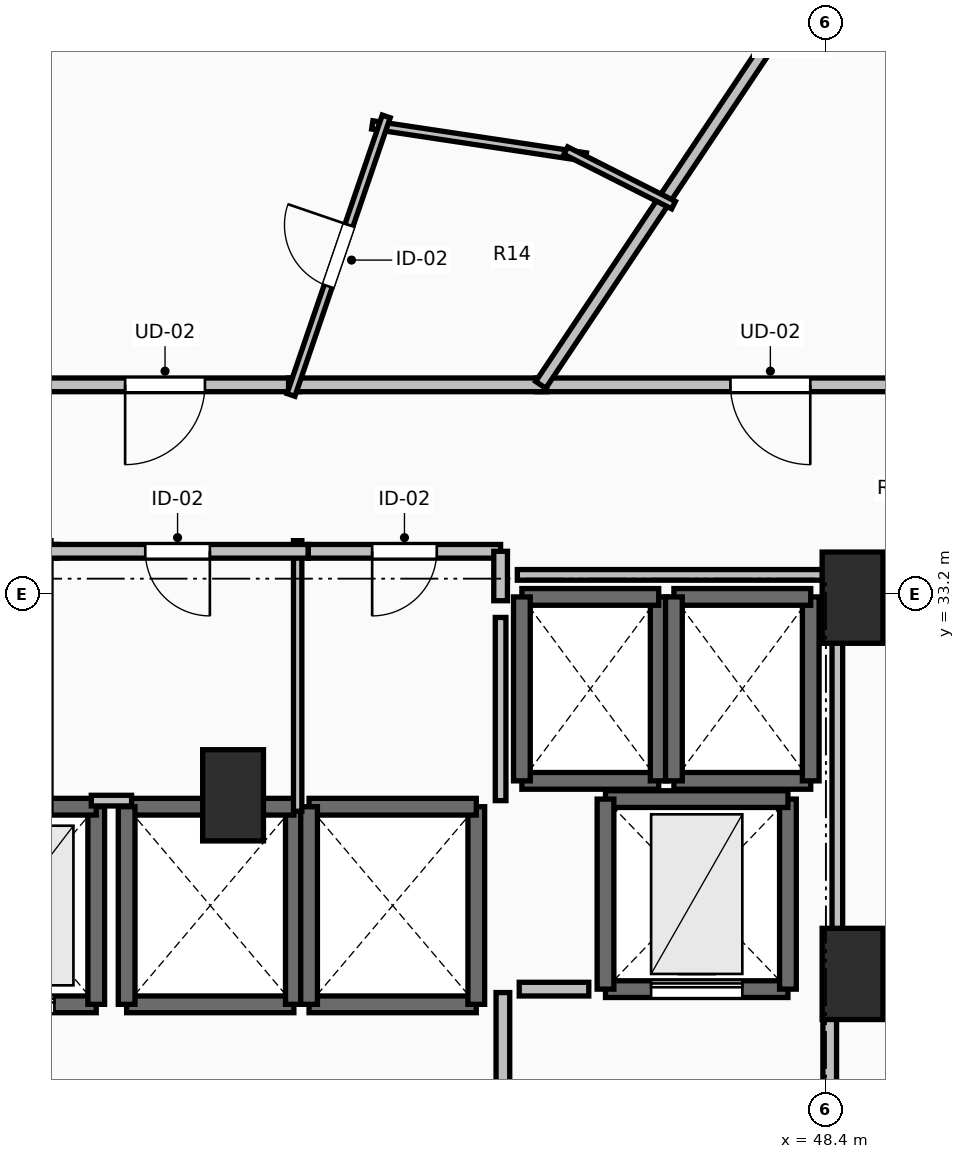
"""IFC4 building model, lengths in metres.
Left out: names, types, materials, properties, quantities, classifications, styles, units other than length and angle.
Written with IfcOpenShell. Run it as: python <this file> out.ifc"""

import sys

from ifc_helpers import new_model, si_unit, direction, frame, frame_2d, origin, origin_2d, place, context, subcontext, project, spatial, rectangle, extrude, element, fill, save


model = new_model("IFC4")
c1 = context("Model", 3, precision=1e-05, world=origin(), true_north=direction((0.0, 1.0)))
c2 = subcontext(c1, "Body", "Model", "MODEL_VIEW")
j1 = project(units=[si_unit("LENGTHUNIT", "METRE"), si_unit("PLANEANGLEUNIT", "RADIAN")], contexts=[c1])
p1 = place(None, origin())
s1 = spatial("IfcSite", under=j1, at=p1, CompositionType="ELEMENT")
p2 = place(p1, origin())
s2 = spatial("IfcBuilding", under=s1, at=p2, CompositionType="ELEMENT")
p3 = place(p2, frame((0.0, 0.0, 45.0)))
s3 = spatial("IfcBuildingStorey", under=s2, at=p3, CompositionType="ELEMENT", Elevation=45.0)
for number, where, z_axis, x_axis in (
    (1, (48.75, 33.15, 0.0), (0.0, 0.0, 1.0), (1.0, 0.0, 0.0)),
    (2, (48.75, 28.2, 0.0), (0.0, 0.0, 1.0), (1.0, 0.0, 0.0)),
    (3, (40.6, 30.55, 0.0), (0.0, 0.0, 1.0), (1.0, 0.0, 0.0)),
):
    element("IfcColumn", number, at=place(p3, frame(where, z_axis=z_axis, x_axis=x_axis)), inside=s3, PredefinedType="PILASTER", context=c2, shape_type="SweptSolid", body=[
        extrude(rectangle(XDim=0.8, YDim=1.2, at=origin_2d()), origin(), (0.0, 0.0, 1.0), 3.5),
    ])
p4 = place(p3, frame((36.6, 27.8, 0.0), z_axis=(0.0, 0.0, 1.0), x_axis=(1.0, 0.0, 0.0)))
e4 = element("IfcWall", 4, at=p4, inside=s3, PredefinedType="SOLIDWALL", context=c2, shape_type="SweptSolid", body=[
    extrude(rectangle(XDim=2.2, YDim=0.22, at=frame_2d((1.1, 0.0))), origin(), (0.0, 0.0, 1.0), 3.24),
])
p5 = place(p4, frame((0.55, 0.0, 0.0)))
e5 = element("IfcOpeningElement", 5, at=p5, cuts=e4, PredefinedType="OPENING", context=c2, shape_type="SweptSolid", body=[
    extrude(rectangle(XDim=1.1, YDim=2.2, at=frame_2d((0.55, 1.1))), frame((0.0, 0.125, 0.0), z_axis=(0.0, -1.0, 0.0), x_axis=(1.0, 0.0, 0.0)), (0.0, 0.0, 1.0), 0.25),
])
p6 = place(p3, frame((38.8, 27.8, 0.0), z_axis=(0.0, 0.0, 1.0), x_axis=(0.0, 1.0, 0.0)))
e6 = element("IfcWall", 6, at=p6, inside=s3, PredefinedType="SOLIDWALL", context=c2, shape_type="SweptSolid", body=[
    extrude(rectangle(XDim=2.6, YDim=0.22, at=frame_2d((1.3, 0.0))), origin(), (0.0, 0.0, 1.0), 3.24),
])
for number, where, z_axis, x_axis in (
    (7, (38.8, 30.4, 0.0), (0.0, 0.0, 1.0), (-1.0, 0.0, 0.0)),
    (8, (39.2, 27.8, 0.0), (0.0, 0.0, 1.0), (1.0, 0.0, 0.0)),
):
    element("IfcWall", number, at=place(p3, frame(where, z_axis=z_axis, x_axis=x_axis)), inside=s3, PredefinedType="SOLIDWALL", context=c2, shape_type="SweptSolid", body=[
        extrude(rectangle(XDim=2.2, YDim=0.22, at=frame_2d((1.1, 0.0))), origin(), (0.0, 0.0, 1.0), 3.24),
    ])
p7 = place(p3, frame((41.4, 27.8, 0.0), z_axis=(0.0, 0.0, 1.0), x_axis=(0.0, 1.0, 0.0)))
e9 = element("IfcWall", 9, at=p7, inside=s3, PredefinedType="SOLIDWALL", context=c2, shape_type="SweptSolid", body=[
    extrude(rectangle(XDim=2.6, YDim=0.22, at=frame_2d((1.3, 0.0))), origin(), (0.0, 0.0, 1.0), 3.24),
])
p8 = place(p3, frame((41.4, 30.4, 0.0), z_axis=(0.0, 0.0, 1.0), x_axis=(-1.0, 0.0, 0.0)))
e10 = element("IfcWall", 10, at=p8, inside=s3, PredefinedType="SOLIDWALL", context=c2, shape_type="SweptSolid", body=[
    extrude(rectangle(XDim=2.2, YDim=0.22, at=frame_2d((1.1, 0.0))), origin(), (0.0, 0.0, 1.0), 3.24),
])
p9 = place(p3, frame((39.2, 30.4, 0.0), z_axis=(0.0, 0.0, 1.0), x_axis=(0.0, -1.0, 0.0)))
e11 = element("IfcWall", 11, at=p9, inside=s3, PredefinedType="SOLIDWALL", context=c2, shape_type="SweptSolid", body=[
    extrude(rectangle(XDim=2.6, YDim=0.22, at=frame_2d((1.3, 0.0))), origin(), (0.0, 0.0, 1.0), 3.24),
])
p10 = place(p3, frame((41.6, 27.8, 0.0), z_axis=(0.0, 0.0, 1.0), x_axis=(1.0, 0.0, 0.0)))
e12 = element("IfcWall", 12, at=p10, inside=s3, PredefinedType="SOLIDWALL", context=c2, shape_type="SweptSolid", body=[
    extrude(rectangle(XDim=2.2, YDim=0.22, at=frame_2d((1.1, 0.0))), origin(), (0.0, 0.0, 1.0), 3.24),
])
p11 = place(p3, frame((43.8, 27.8, 0.0), z_axis=(0.0, 0.0, 1.0), x_axis=(0.0, 1.0, 0.0)))
e13 = element("IfcWall", 13, at=p11, inside=s3, PredefinedType="SOLIDWALL", context=c2, shape_type="SweptSolid", body=[
    extrude(rectangle(XDim=2.6, YDim=0.22, at=frame_2d((1.3, 0.0))), origin(), (0.0, 0.0, 1.0), 3.24),
])
p12 = place(p3, frame((43.8, 30.4, 0.0), z_axis=(0.0, 0.0, 1.0), x_axis=(-1.0, 0.0, 0.0)))
e14 = element("IfcWall", 14, at=p12, inside=s3, PredefinedType="SOLIDWALL", context=c2, shape_type="SweptSolid", body=[
    extrude(rectangle(XDim=2.2, YDim=0.22, at=frame_2d((1.1, 0.0))), origin(), (0.0, 0.0, 1.0), 3.24),
])
p13 = place(p3, frame((41.6, 30.4, 0.0), z_axis=(0.0, 0.0, 1.0), x_axis=(0.0, -1.0, 0.0)))
e15 = element("IfcWall", 15, at=p13, inside=s3, PredefinedType="SOLIDWALL", context=c2, shape_type="SweptSolid", body=[
    extrude(rectangle(XDim=2.6, YDim=0.22, at=frame_2d((1.3, 0.0))), origin(), (0.0, 0.0, 1.0), 3.24),
])
p14 = place(p3, frame((44.4, 30.74, 0.0), z_axis=(0.0, 0.0, 1.0), x_axis=(1.0, 0.0, 0.0)))
e16 = element("IfcWall", 16, at=p14, inside=s3, PredefinedType="SOLIDWALL", context=c2, shape_type="SweptSolid", body=[
    extrude(rectangle(XDim=1.8, YDim=0.22, at=frame_2d((0.9, 0.0))), origin(), (0.0, 0.0, 1.0), 3.24),
])
p15 = place(p3, frame((46.2, 30.74, 0.0), z_axis=(0.0, 0.0, 1.0), x_axis=(0.0, 1.0, 0.0)))
e17 = element("IfcWall", 17, at=p15, inside=s3, PredefinedType="SOLIDWALL", context=c2, shape_type="SweptSolid", body=[
    extrude(rectangle(XDim=2.42, YDim=0.22, at=frame_2d((1.21, 0.0))), origin(), (0.0, 0.0, 1.0), 3.24),
])
p16 = place(p3, frame((46.2, 33.16, 0.0), z_axis=(0.0, 0.0, 1.0), x_axis=(-1.0, 0.0, 0.0)))
e18 = element("IfcWall", 18, at=p16, inside=s3, PredefinedType="SOLIDWALL", context=c2, shape_type="SweptSolid", body=[
    extrude(rectangle(XDim=1.8, YDim=0.22, at=frame_2d((0.9, 0.0))), origin(), (0.0, 0.0, 1.0), 3.24),
])
p17 = place(p3, frame((44.4, 33.16, 0.0), z_axis=(0.0, 0.0, 1.0), x_axis=(0.0, -1.0, 0.0)))
e19 = element("IfcWall", 19, at=p17, inside=s3, PredefinedType="SOLIDWALL", context=c2, shape_type="SweptSolid", body=[
    extrude(rectangle(XDim=2.42, YDim=0.22, at=frame_2d((1.21, 0.0))), origin(), (0.0, 0.0, 1.0), 3.24),
])
p18 = place(p3, frame((46.4, 30.74, 0.0), z_axis=(0.0, 0.0, 1.0), x_axis=(1.0, 0.0, 0.0)))
e20 = element("IfcWall", 20, at=p18, inside=s3, PredefinedType="SOLIDWALL", context=c2, shape_type="SweptSolid", body=[
    extrude(rectangle(XDim=1.8, YDim=0.22, at=frame_2d((0.9, 0.0))), origin(), (0.0, 0.0, 1.0), 3.24),
])
p19 = place(p3, frame((48.2, 30.74, 0.0), z_axis=(0.0, 0.0, 1.0), x_axis=(0.0, 1.0, 0.0)))
e21 = element("IfcWall", 21, at=p19, inside=s3, PredefinedType="SOLIDWALL", context=c2, shape_type="SweptSolid", body=[
    extrude(rectangle(XDim=2.42, YDim=0.22, at=frame_2d((1.21, 0.0))), origin(), (0.0, 0.0, 1.0), 3.24),
])
p20 = place(p3, frame((48.2, 33.16, 0.0), z_axis=(0.0, 0.0, 1.0), x_axis=(-1.0, 0.0, 0.0)))
e22 = element("IfcWall", 22, at=p20, inside=s3, PredefinedType="SOLIDWALL", context=c2, shape_type="SweptSolid", body=[
    extrude(rectangle(XDim=1.8, YDim=0.22, at=frame_2d((0.9, 0.0))), origin(), (0.0, 0.0, 1.0), 3.24),
])
p21 = place(p3, frame((46.4, 33.16, 0.0), z_axis=(0.0, 0.0, 1.0), x_axis=(0.0, -1.0, 0.0)))
e23 = element("IfcWall", 23, at=p21, inside=s3, PredefinedType="SOLIDWALL", context=c2, shape_type="SweptSolid", body=[
    extrude(rectangle(XDim=2.42, YDim=0.22, at=frame_2d((1.21, 0.0))), origin(), (0.0, 0.0, 1.0), 3.24),
])
p22 = place(p3, frame((45.5, 28.0, 0.0), z_axis=(0.0, 0.0, 1.0), x_axis=(1.0, 0.0, 0.0)))
e24 = element("IfcWall", 24, at=p22, inside=s3, PredefinedType="SHEAR", context=c2, shape_type="SweptSolid", body=[
    extrude(rectangle(XDim=2.4, YDim=0.22, at=frame_2d((1.2, 0.0))), origin(), (0.0, 0.0, 1.0), 3.24),
])
p23 = place(p22, frame((0.6, 0.0, 0.0)))
e25 = element("IfcOpeningElement", 25, at=p23, cuts=e24, PredefinedType="OPENING", context=c2, shape_type="SweptSolid", body=[
    extrude(rectangle(XDim=1.2, YDim=2.2, at=frame_2d((0.6, 1.1))), frame((0.0, 0.125, 0.0), z_axis=(0.0, -1.0, 0.0), x_axis=(1.0, 0.0, 0.0)), (0.0, 0.0, 1.0), 0.25),
])
p24 = place(p3, frame((47.9, 28.0, 0.0), z_axis=(0.0, 0.0, 1.0), x_axis=(0.0, 1.0, 0.0)))
e26 = element("IfcWall", 26, at=p24, inside=s3, PredefinedType="SHEAR", context=c2, shape_type="SweptSolid", body=[
    extrude(rectangle(XDim=2.5, YDim=0.22, at=frame_2d((1.25, 0.0))), origin(), (0.0, 0.0, 1.0), 3.24),
])
p25 = place(p3, frame((47.9, 30.5, 0.0), z_axis=(0.0, 0.0, 1.0), x_axis=(-1.0, 0.0, 0.0)))
e27 = element("IfcWall", 27, at=p25, inside=s3, PredefinedType="SHEAR", context=c2, shape_type="SweptSolid", body=[
    extrude(rectangle(XDim=2.4, YDim=0.22, at=frame_2d((1.2, 0.0))), origin(), (0.0, 0.0, 1.0), 3.24),
])
p26 = place(p3, frame((45.5, 30.5, 0.0), z_axis=(0.0, 0.0, 1.0), x_axis=(0.0, -1.0, 0.0)))
e28 = element("IfcWall", 28, at=p26, inside=s3, PredefinedType="SHEAR", context=c2, shape_type="SweptSolid", body=[
    extrude(rectangle(XDim=2.5, YDim=0.22, at=frame_2d((1.25, 0.0))), origin(), (0.0, 0.0, 1.0), 3.24),
])
p27 = place(p3, frame((44.15, 27.955, 0.0), z_axis=(0.0, 0.0, 1.0), x_axis=(0.0, -1.0, 0.0)))
e29 = element("IfcWall", 29, at=p27, inside=s3, PredefinedType="PARTITIONING", context=c2, shape_type="SweptSolid", body=[
    extrude(rectangle(XDim=3.91, YDim=0.18, at=frame_2d((1.955, 0.0))), origin(), (0.0, 0.0, 1.0), 3.24),
])
p28 = place(p27, frame((1.355, 0.0, 0.0)))
e30 = element("IfcOpeningElement", 30, at=p28, cuts=e29, PredefinedType="OPENING", context=c2, shape_type="SweptSolid", body=[
    extrude(rectangle(XDim=1.2, YDim=2.15, at=frame_2d((0.6, 1.075))), frame((0.0, 0.105, 0.0), z_axis=(0.0, -1.0, 0.0), x_axis=(1.0, 0.0, 0.0)), (0.0, 0.0, 1.0), 0.21),
])
p29 = place(p3, frame((48.45, 23.95, 0.0), z_axis=(0.0, 0.0, 1.0), x_axis=(0.0, 1.0, 0.0)))
e31 = element("IfcWall", 31, at=p29, inside=s3, PredefinedType="PARTITIONING", context=c2, shape_type="SweptSolid", body=[
    extrude(rectangle(XDim=4.05, YDim=0.18, at=frame_2d((2.025, 0.0))), origin(), (0.0, 0.0, 1.0), 3.24),
])
p30 = place(p29, frame((1.425, 0.0, 0.0)))
e32 = element("IfcOpeningElement", 32, at=p30, cuts=e31, PredefinedType="OPENING", context=c2, shape_type="SweptSolid", body=[
    extrude(rectangle(XDim=1.2, YDim=2.15, at=frame_2d((0.6, 1.075))), frame((0.0, 0.105, 0.0), z_axis=(0.0, -1.0, 0.0), x_axis=(1.0, 0.0, 0.0)), (0.0, 0.0, 1.0), 0.21),
])
p31 = place(p3, frame((38.29, 33.76, 0.0), z_axis=(0.0, 0.0, 1.0), x_axis=(-1.0, 0.0, 0.0)))
e33 = element("IfcWall", 33, at=p31, inside=s3, PredefinedType="PARTITIONING", context=c2, shape_type="SweptSolid", body=[
    extrude(rectangle(XDim=2.74, YDim=0.18, at=frame_2d((1.37, 0.0))), origin(), (0.0, 0.0, 1.0), 3.24),
])
p32 = place(p31, frame((0.945, 0.0, 0.0)))
e34 = element("IfcOpeningElement", 34, at=p32, cuts=e33, PredefinedType="OPENING", context=c2, shape_type="SweptSolid", body=[
    extrude(rectangle(XDim=0.85, YDim=2.1, at=frame_2d((0.425, 1.05))), frame((0.0, 0.105, 0.0), z_axis=(0.0, -1.0, 0.0), x_axis=(1.0, 0.0, 0.0)), (0.0, 0.0, 1.0), 0.21),
])
p33 = place(p3, frame((41.45, 30.34, 0.0), z_axis=(0.0, 0.0, 1.0), x_axis=(0.0, 1.0, 0.0)))
e35 = element("IfcWall", 35, at=p33, inside=s3, PredefinedType="PARTITIONING", context=c2, shape_type="SweptSolid", body=[
    extrude(rectangle(XDim=3.56, YDim=0.11, at=frame_2d((1.78, 0.0))), origin(), (0.0, 0.0, 1.0), 3.24),
])
p34 = place(p3, frame((41.59, 33.76, 0.0), z_axis=(0.0, 0.0, 1.0), x_axis=(-1.0, 0.0, 0.0)))
e36 = element("IfcWall", 36, at=p34, inside=s3, PredefinedType="PARTITIONING", context=c2, shape_type="SweptSolid", body=[
    extrude(rectangle(XDim=3.44, YDim=0.18, at=frame_2d((1.72, 0.0))), origin(), (0.0, 0.0, 1.0), 3.24),
])
p35 = place(p34, frame((1.295, 0.0, 0.0)))
e37 = element("IfcOpeningElement", 37, at=p35, cuts=e36, PredefinedType="OPENING", context=c2, shape_type="SweptSolid", body=[
    extrude(rectangle(XDim=0.85, YDim=2.1, at=frame_2d((0.425, 1.05))), frame((0.0, 0.105, 0.0), z_axis=(0.0, -1.0, 0.0), x_axis=(1.0, 0.0, 0.0)), (0.0, 0.0, 1.0), 0.21),
])
p36 = place(p3, frame((44.12, 33.76, 0.0), z_axis=(0.0, 0.0, 1.0), x_axis=(-1.0, 0.0, 0.0)))
e38 = element("IfcWall", 38, at=p36, inside=s3, PredefinedType="PARTITIONING", context=c2, shape_type="SweptSolid", body=[
    extrude(rectangle(XDim=2.53, YDim=0.18, at=frame_2d((1.265, 0.0))), origin(), (0.0, 0.0, 1.0), 3.24),
])
p37 = place(p36, frame((0.84, 0.0, 0.0)))
e39 = element("IfcOpeningElement", 39, at=p37, cuts=e38, PredefinedType="OPENING", context=c2, shape_type="SweptSolid", body=[
    extrude(rectangle(XDim=0.85, YDim=2.1, at=frame_2d((0.425, 1.05))), frame((0.0, 0.105, 0.0), z_axis=(0.0, -1.0, 0.0), x_axis=(1.0, 0.0, 0.0)), (0.0, 0.0, 1.0), 0.21),
])
p38 = place(p3, frame((44.12, 33.11, 0.0), z_axis=(0.0, 0.0, 1.0), x_axis=(0.0, 1.0, 0.0)))
e40 = element("IfcWall", 40, at=p38, inside=s3, PredefinedType="PARTITIONING", context=c2, shape_type="SweptSolid", body=[
    extrude(rectangle(XDim=0.65, YDim=0.18, at=frame_2d((0.325, 0.0))), origin(), (0.0, 0.0, 1.0), 3.24),
])
p39 = place(p3, frame((50.75, 35.95, 0.0), z_axis=(0.0, 0.0, 1.0), x_axis=(-1.0, 0.0, 0.0)))
e41 = element("IfcWall", 41, at=p39, inside=s3, PredefinedType="PARTITIONING", context=c2, shape_type="SweptSolid", body=[
    extrude(rectangle(XDim=6.162, YDim=0.18, at=frame_2d((3.081, 0.0))), origin(), (0.0, 0.0, 1.0), 2.432),
])
p40 = place(p39, frame((2.556, 0.0, 0.0)))
e42 = element("IfcOpeningElement", 42, at=p40, cuts=e41, PredefinedType="OPENING", context=c2, shape_type="SweptSolid", body=[
    extrude(rectangle(XDim=1.05, YDim=2.2, at=frame_2d((0.525, 1.1))), frame((0.0, 0.105, 0.0), z_axis=(0.0, -1.0, 0.0), x_axis=(1.0, 0.0, 0.0)), (0.0, 0.0, 1.0), 0.21),
])
p41 = place(p3, frame((41.47, 35.95, 0.0), z_axis=(0.0, 0.0, 1.0), x_axis=(-1.0, 0.0, 0.0)))
e43 = element("IfcWall", 43, at=p41, inside=s3, PredefinedType="PARTITIONING", context=c2, shape_type="SweptSolid", body=[
    extrude(rectangle(XDim=3.53, YDim=0.18, at=frame_2d((1.765, 0.0))), origin(), (0.0, 0.0, 1.0), 3.24),
])
p42 = place(p41, frame((1.24, 0.0, 0.0)))
e44 = element("IfcOpeningElement", 44, at=p42, cuts=e43, PredefinedType="OPENING", context=c2, shape_type="SweptSolid", body=[
    extrude(rectangle(XDim=1.05, YDim=2.2, at=frame_2d((0.525, 1.1))), frame((0.0, 0.105, 0.0), z_axis=(0.0, -1.0, 0.0), x_axis=(1.0, 0.0, 0.0)), (0.0, 0.0, 1.0), 0.21),
])
p43 = place(p3, frame((44.728, 35.95, 0.0), z_axis=(0.0, 0.0, 1.0), x_axis=(-1.0, 0.0, 0.0)))
e45 = element("IfcWall", 45, at=p43, inside=s3, PredefinedType="PARTITIONING", context=c2, shape_type="SweptSolid", body=[
    extrude(rectangle(XDim=3.398, YDim=0.18, at=frame_2d((1.699, 0.0))), origin(), (0.0, 0.0, 1.0), 3.24),
])
p44 = place(p3, frame((51.267, 45.856, 0.0), z_axis=(0.0, 0.0, 1.0), x_axis=(-0.55557946655, -0.831463442581, 0.0)))
e46 = element("IfcWall", 46, at=p44, inside=s3, PredefinedType="PARTITIONING", context=c2, shape_type="SweptSolid", body=[
    extrude(rectangle(XDim=11.914, YDim=0.16, at=frame_2d((5.957, 0.0))), origin(), (0.0, 0.0, 1.0), 2.432),
])
p45 = place(p3, frame((42.432, 39.37, 0.0), z_axis=(0.0, 0.0, 1.0), x_axis=(0.988877663763, -0.148731187416, 0.0)))
e47 = element("IfcWall", 47, at=p45, inside=s3, PredefinedType="PARTITIONING", context=c2, shape_type="SweptSolid", body=[
    extrude(rectangle(XDim=2.841, YDim=0.11, at=frame_2d((1.421, 0.0))), origin(), (0.0, 0.0, 1.0), 3.24),
])
p46 = place(p3, frame((44.978, 39.031, 0.0), z_axis=(0.0, 0.0, 1.0), x_axis=(0.892388427115, -0.451268096758, 0.0)))
e48 = element("IfcWall", 48, at=p46, inside=s3, PredefinedType="PARTITIONING", context=c2, shape_type="SweptSolid", body=[
    extrude(rectangle(XDim=1.588, YDim=0.11, at=frame_2d((0.794, 0.0))), origin(), (0.0, 0.0, 1.0), 3.24),
])
p47 = place(p3, frame((41.362, 35.817, 0.0), z_axis=(0.0, 0.0, 1.0), x_axis=(0.323669856167, 0.946170082072, 0.0)))
e49 = element("IfcWall", 49, at=p47, inside=s3, PredefinedType="PARTITIONING", context=c2, shape_type="SweptSolid", body=[
    extrude(rectangle(XDim=3.873, YDim=0.11, at=frame_2d((1.936, 0.0))), origin(), (0.0, 0.0, 1.0), 2.886),
])
p48 = place(p47, frame((1.511, 0.0, 0.0)))
e50 = element("IfcOpeningElement", 50, at=p48, cuts=e49, PredefinedType="OPENING", context=c2, shape_type="SweptSolid", body=[
    extrude(rectangle(XDim=0.85, YDim=2.1, at=frame_2d((0.425, 1.05))), frame((0.0, 0.07, 0.0), z_axis=(0.0, -1.0, 0.0), x_axis=(1.0, 0.0, 0.0)), (0.0, 0.0, 1.0), 0.14),
])
p49 = place(p3, frame((45.28, 28.0, 0.0), z_axis=(0.0, 0.0, 1.0), x_axis=(-1.0, 0.0, 0.0)))
e51 = element("IfcWall", 51, at=p49, inside=s3, PredefinedType="PARTITIONING", context=c2, shape_type="SweptSolid", body=[
    extrude(rectangle(XDim=0.915, YDim=0.18, at=frame_2d((0.458, 0.0))), origin(), (0.0, 0.0, 1.0), 3.24),
])
p50 = place(p3, frame((38.735, 30.48, 0.0), z_axis=(0.0, 0.0, 1.0), x_axis=(1.0, 0.0, 0.0)))
e52 = element("IfcWall", 52, at=p50, inside=s3, PredefinedType="PARTITIONING", context=c2, shape_type="SweptSolid", body=[
    extrude(rectangle(XDim=0.53, YDim=0.14, at=frame_2d((0.265, 0.0))), origin(), (0.0, 0.0, 1.0), 2.432),
])
p51 = place(p3, frame((44.12, 30.48, 0.0), z_axis=(0.0, 0.0, 1.0), x_axis=(0.0, 1.0, 0.0)))
e53 = element("IfcWall", 53, at=p51, inside=s3, PredefinedType="PARTITIONING", context=c2, shape_type="SweptSolid", body=[
    extrude(rectangle(XDim=2.41, YDim=0.14, at=frame_2d((1.205, 0.0))), origin(), (0.0, 0.0, 1.0), 3.24),
])
p52 = place(p3, frame((44.34, 33.45, 0.0), z_axis=(0.0, 0.0, 1.0), x_axis=(1.0, 0.0, 0.0)))
e54 = element("IfcWall", 54, at=p52, inside=s3, PredefinedType="PARTITIONING", context=c2, shape_type="SweptSolid", body=[
    extrude(rectangle(XDim=4.21, YDim=0.14, at=frame_2d((2.105, 0.0))), origin(), (0.0, 0.0, 1.0), 2.432),
])
p53 = place(p3, frame((48.55, 33.45, 0.0), z_axis=(0.0, 0.0, 1.0), x_axis=(0.0, -1.0, 0.0)))
e55 = element("IfcWall", 55, at=p53, inside=s3, PredefinedType="PARTITIONING", context=c2, shape_type="SweptSolid", body=[
    extrude(rectangle(XDim=5.254, YDim=0.14, at=frame_2d((2.627, 0.0))), origin(), (0.0, 0.0, 1.0), 2.432),
])
p54 = place(p5, origin())
e56 = element("IfcDoor", 56, at=p54, inside=s3, OperationType="SLIDING_TO_LEFT", PredefinedType="DOOR", context=c2, shape_type="SweptSolid", body=[
    extrude(rectangle(XDim=1.1, YDim=2.2, at=frame_2d((0.55, 1.1))), frame((0.0, 0.025, 0.0), z_axis=(0.0, -1.0, 0.0), x_axis=(1.0, 0.0, 0.0)), (0.0, 0.0, 1.0), 0.05),
])
fill(e5, e56)
p55 = place(p23, origin())
e57 = element("IfcDoor", 57, at=p55, inside=s3, OperationType="SLIDING_TO_LEFT", PredefinedType="DOOR", context=c2, shape_type="SweptSolid", body=[
    extrude(rectangle(XDim=1.2, YDim=2.2, at=frame_2d((0.6, 1.1))), frame((0.0, 0.025, 0.0), z_axis=(0.0, -1.0, 0.0), x_axis=(1.0, 0.0, 0.0)), (0.0, 0.0, 1.0), 0.05),
])
fill(e25, e57)
p56 = place(p35, origin())
e58 = element("IfcDoor", 58, at=p56, inside=s3, OperationType="SINGLE_SWING_LEFT", PredefinedType="DOOR", context=c2, shape_type="SweptSolid", body=[
    extrude(rectangle(XDim=0.85, YDim=2.1, at=frame_2d((0.425, 1.05))), frame((0.0, 0.025, 0.0), z_axis=(0.0, -1.0, 0.0), x_axis=(1.0, 0.0, 0.0)), (0.0, 0.0, 1.0), 0.05),
])
fill(e37, e58)
p57 = place(p37, origin())
e59 = element("IfcDoor", 59, at=p57, inside=s3, OperationType="SINGLE_SWING_RIGHT", PredefinedType="DOOR", context=c2, shape_type="SweptSolid", body=[
    extrude(rectangle(XDim=0.85, YDim=2.1, at=frame_2d((0.425, 1.05))), frame((0.0, 0.025, 0.0), z_axis=(0.0, -1.0, 0.0), x_axis=(1.0, 0.0, 0.0)), (0.0, 0.0, 1.0), 0.05),
])
fill(e39, e59)
p58 = place(p40, origin())
e60 = element("IfcDoor", 60, at=p58, inside=s3, OperationType="SINGLE_SWING_LEFT", PredefinedType="DOOR", context=c2, shape_type="SweptSolid", body=[
    extrude(rectangle(XDim=1.05, YDim=2.2, at=frame_2d((0.525, 1.1))), frame((0.0, 0.025, 0.0), z_axis=(0.0, -1.0, 0.0), x_axis=(1.0, 0.0, 0.0)), (0.0, 0.0, 1.0), 0.05),
])
fill(e42, e60)
p59 = place(p42, origin())
e61 = element("IfcDoor", 61, at=p59, inside=s3, OperationType="SINGLE_SWING_RIGHT", PredefinedType="DOOR", context=c2, shape_type="SweptSolid", body=[
    extrude(rectangle(XDim=1.05, YDim=2.2, at=frame_2d((0.525, 1.1))), frame((0.0, 0.025, 0.0), z_axis=(0.0, -1.0, 0.0), x_axis=(1.0, 0.0, 0.0)), (0.0, 0.0, 1.0), 0.05),
])
fill(e44, e61)
p60 = place(p48, origin())
e62 = element("IfcDoor", 62, at=p60, inside=s3, OperationType="SINGLE_SWING_RIGHT", PredefinedType="DOOR", context=c2, shape_type="SweptSolid", body=[
    extrude(rectangle(XDim=0.85, YDim=2.1, at=frame_2d((0.425, 1.05))), frame((0.0, 0.025, 0.0), z_axis=(0.0, -1.0, 0.0), x_axis=(1.0, 0.0, 0.0)), (0.0, 0.0, 1.0), 0.05),
])
fill(e50, e62)
save(model, sys.argv[1])
